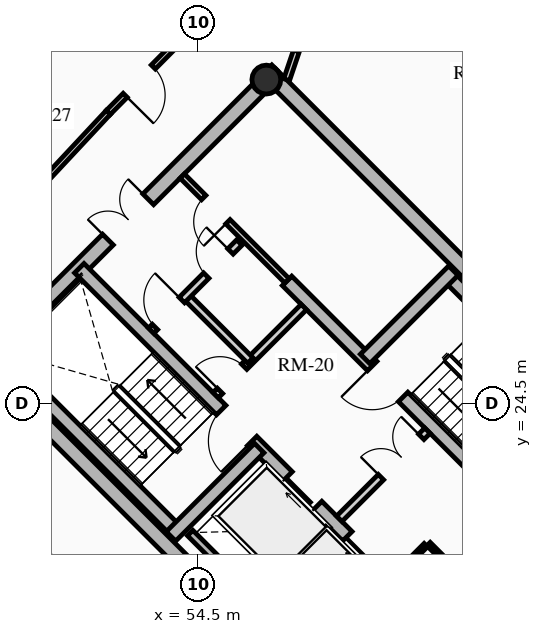
"""IFC4 building model, lengths in metres.
Left out: names, types, materials, properties, quantities, classifications, styles, units other than length and angle.
Written with IfcOpenShell. Run it as: python <this file> out.ifc"""

import sys

from ifc_helpers import new_model, si_unit, direction, frame, frame_2d, origin, origin_2d, place, context, subcontext, project, spatial, rectangle, hollow_circle, extrude, source, transform, mapped, element, fill, save


model = new_model("IFC4")
c1 = context("Model", 3, precision=1e-05, world=origin(), true_north=direction((0.0, 1.0)))
c2 = subcontext(c1, "Body", "Model", "MODEL_VIEW")
j1 = project(units=[si_unit("LENGTHUNIT", "METRE"), si_unit("PLANEANGLEUNIT", "RADIAN")], contexts=[c1])
p1 = place(None, origin())
s1 = spatial("IfcSite", under=j1, at=p1, CompositionType="ELEMENT")
p2 = place(p1, origin())
s2 = spatial("IfcBuilding", under=s1, at=p2, CompositionType="ELEMENT")
p3 = place(p2, frame((0.0, 0.0, 160.33)))
s3 = spatial("IfcBuildingStorey", under=s2, at=p3, CompositionType="ELEMENT", Elevation=160.33)
for number, where, z_axis, x_axis in (
    (1, (58.702, 15.732, 0.0), (0.0, 0.0, 1.0), (-0.707, 0.707, 0.0)),
    (2, (66.268, 23.298, 0.0), (0.0, 0.0, 1.0), (-0.707, 0.707, 0.0)),
):
    element("IfcWall", number, at=place(p3, frame(where, z_axis=z_axis, x_axis=x_axis)), inside=s3, PredefinedType="SHEAR", context=c2, shape_type="SweptSolid", body=[
        extrude(rectangle(XDim=14.1, YDim=0.4, at=frame_2d((7.05, 0.0))), origin(), (0.0, 0.0, 1.0), 2.91),
    ])
p4 = place(p3, frame((58.561, 15.873, 0.0), z_axis=(0.0, 0.0, 1.0), x_axis=(0.707106781187, 0.707106781187, 0.0)))
e3 = element("IfcWall", 3, at=p4, inside=s3, PredefinedType="SHEAR", context=c2, shape_type="SweptSolid", body=[
    extrude(rectangle(XDim=10.7, YDim=0.4, at=frame_2d((5.35, 0.0))), origin(), (0.0, 0.0, 1.0), 2.91),
])
m1 = source(origin(), c2, "Body", "SweptSolid", [
    extrude(rectangle(XDim=1.5, YDim=2.02, at=frame_2d((0.75, 1.01))), frame((0.0, 0.21, 0.0), z_axis=(0.0, -1.0, 0.0), x_axis=(1.0, 0.0, 0.0)), (0.0, 0.0, 1.0), 0.42),
])
p5 = place(p4, frame((5.45, 0.0, 0.0)))
e4 = element("IfcOpeningElement", 4, at=p5, cuts=e3, PredefinedType="OPENING", context=c2, shape_type="MappedRepresentation", body=[
    mapped(m1, transform((0.0, 0.0, 0.0), x_axis=(1.0, 0.0, 0.0), y_axis=(0.0, 1.0, 0.0), z_axis=(0.0, 0.0, 1.0), scale=1.0)),
])
p6 = place(p3, frame((48.873, 25.561, 0.0), z_axis=(0.0, 0.0, 1.0), x_axis=(0.707106781187, 0.707106781187, 0.0)))
e5 = element("IfcWall", 5, at=p6, inside=s3, PredefinedType="SHEAR", context=c2, shape_type="SweptSolid", body=[
    extrude(rectangle(XDim=10.7, YDim=0.4, at=frame_2d((5.35, 0.0))), origin(), (0.0, 0.0, 1.0), 2.91),
])
p7 = place(p6, frame((4.6, 0.0, 0.0)))
e6 = element("IfcOpeningElement", 6, at=p7, cuts=e5, PredefinedType="OPENING", context=c2, shape_type="MappedRepresentation", body=[
    mapped(m1, transform((0.0, 0.0, 0.0), x_axis=(1.0, 0.0, 0.0), y_axis=(0.0, 1.0, 0.0), z_axis=(0.0, 0.0, 1.0), scale=1.0)),
])
p8 = place(p3, frame((61.06, 18.373, 0.0), z_axis=(0.0, 0.0, 1.0), x_axis=(-0.707106781187, 0.707106781187, 0.0)))
e7 = element("IfcWall", 7, at=p8, inside=s3, PredefinedType="SHEAR", context=c2, shape_type="SweptSolid", body=[
    extrude(rectangle(XDim=13.7, YDim=0.35, at=frame_2d((6.85, 0.0))), origin(), (0.0, 0.0, 1.0), 2.91),
])
m2 = source(origin(), c2, "Body", "SweptSolid", [
    extrude(rectangle(XDim=1.1, YDim=2.015, at=frame_2d((0.55, 1.007))), frame((0.0, 0.185, 0.0), z_axis=(0.0, -1.0, 0.0), x_axis=(1.0, 0.0, 0.0)), (0.0, 0.0, 1.0), 0.37),
])
p9 = place(p8, frame((4.85, 0.0, 0.0)))
e8 = element("IfcOpeningElement", 8, at=p9, cuts=e7, PredefinedType="OPENING", context=c2, shape_type="MappedRepresentation", body=[
    mapped(m2, transform((0.0, 0.0, 0.0), x_axis=(1.0, 0.0, 0.0), y_axis=(0.0, 1.0, 0.0), z_axis=(0.0, 0.0, 1.0), scale=1.0)),
])
p10 = place(p8, frame((0.625, 0.0, 0.0)))
e9 = element("IfcOpeningElement", 9, at=p10, cuts=e7, PredefinedType="OPENING", context=c2, shape_type="MappedRepresentation", body=[
    mapped(m2, transform((0.0, 0.0, 0.0), x_axis=(1.0, 0.0, 0.0), y_axis=(0.0, 1.0, 0.0), z_axis=(0.0, 0.0, 1.0), scale=1.0)),
])
p11 = place(p8, frame((2.625, 0.0, 0.0)))
e10 = element("IfcOpeningElement", 10, at=p11, cuts=e7, PredefinedType="OPENING", context=c2, shape_type="MappedRepresentation", body=[
    mapped(m2, transform((0.0, 0.0, 0.0), x_axis=(1.0, 0.0, 0.0), y_axis=(0.0, 1.0, 0.0), z_axis=(0.0, 0.0, 1.0), scale=1.0)),
])
m3 = source(origin(), c2, "Body", "SweptSolid", [
    extrude(rectangle(XDim=1.15, YDim=2.02, at=frame_2d((0.575, 1.01))), frame((0.0, 0.185, 0.0), z_axis=(0.0, -1.0, 0.0), x_axis=(1.0, 0.0, 0.0)), (0.0, 0.0, 1.0), 0.37),
])
p12 = place(p8, frame((7.27, 0.0, 0.0)))
e11 = element("IfcOpeningElement", 11, at=p12, cuts=e7, PredefinedType="OPENING", context=c2, shape_type="MappedRepresentation", body=[
    mapped(m3, transform((0.0, 0.0, 0.0), x_axis=(1.0, 0.0, 0.0), y_axis=(0.0, 1.0, 0.0), z_axis=(0.0, 0.0, 1.0), scale=1.0)),
])
p13 = place(p3, frame((63.627, 20.94, 0.0), z_axis=(0.0, 0.0, 1.0), x_axis=(-0.707119496762, 0.707094065383, 0.0)))
e12 = element("IfcWall", 12, at=p13, inside=s3, PredefinedType="SHEAR", context=c2, shape_type="SweptSolid", body=[
    extrude(rectangle(XDim=9.6, YDim=0.35, at=frame_2d((4.8, 0.0))), origin(), (0.0, 0.0, 1.0), 2.91),
])
p14 = place(p13, frame((5.28, 0.0, 0.0)))
e13 = element("IfcOpeningElement", 13, at=p14, cuts=e12, PredefinedType="OPENING", context=c2, shape_type="MappedRepresentation", body=[
    mapped(m3, transform((0.0, 0.0, 0.0), x_axis=(1.0, 0.0, 0.0), y_axis=(0.0, 1.0, 0.0), z_axis=(0.0, 0.0, 1.0), scale=1.0)),
])
p15 = place(p3, frame((53.922, 21.141, 0.0), z_axis=(0.0, 0.0, 1.0), x_axis=(-0.707106781187, 0.707106781187, 0.0)))
e14 = element("IfcWall", 14, at=p15, inside=s3, PredefinedType="SHEAR", context=c2, shape_type="SweptSolid", body=[
    extrude(rectangle(XDim=6.695, YDim=0.35, at=frame_2d((3.348, 0.0))), origin(), (0.0, 0.0, 1.0), 2.91),
])
p16 = place(p3, frame((53.784, 21.003, 0.0), z_axis=(0.0, 0.0, 1.0), x_axis=(0.707106781187, 0.707106781187, 0.0)))
e15 = element("IfcWall", 15, at=p16, inside=s3, PredefinedType="SHEAR", context=c2, shape_type="SweptSolid", body=[
    extrude(rectangle(XDim=3.285, YDim=0.35, at=frame_2d((1.643, 0.0))), origin(), (0.0, 0.0, 1.0), 2.91),
])
p17 = place(p3, frame((65.812, 23.125, 0.0), z_axis=(0.0, 0.0, 1.0), x_axis=(-0.707106781187, 0.707106781187, 0.0)))
e16 = element("IfcWall", 16, at=p17, inside=s3, PredefinedType="SHEAR", context=c2, shape_type="SweptSolid", body=[
    extrude(rectangle(XDim=6.695, YDim=0.35, at=frame_2d((3.348, 0.0))), origin(), (0.0, 0.0, 1.0), 2.91),
])
p18 = place(p3, frame((58.893, 25.674, 0.0), z_axis=(0.0, 0.0, 1.0), x_axis=(0.707106781187, 0.707106781187, 0.0)))
e17 = element("IfcWall", 17, at=p18, inside=s3, PredefinedType="SHEAR", context=c2, shape_type="SweptSolid", body=[
    extrude(rectangle(XDim=3.285, YDim=0.35, at=frame_2d((1.643, 0.0))), origin(), (0.0, 0.0, 1.0), 2.91),
])
p19 = place(p3, frame((56.294, 33.024, 0.0), z_axis=(0.0, 0.0, 1.0), x_axis=(0.707106781187, 0.707106781187, 0.0)))
e18 = element("IfcColumn", 18, at=p19, inside=s3, PredefinedType="COLUMN", context=c2, shape_type="SweptSolid", body=[
    extrude(hollow_circle(Radius=0.38, WallThickness=0.032, at=origin_2d()), origin(), (0.0, 0.0, 1.0), 2.91),
])
p20 = place(p3, frame((55.888, 19.069, 0.0), z_axis=(0.0, 0.0, 1.0), x_axis=(0.707106781187, 0.707106781187, 0.0)))
e19 = element("IfcWall", 19, at=p20, inside=s3, PredefinedType="SHEAR", context=c2, shape_type="SweptSolid", body=[
    extrude(rectangle(XDim=2.97, YDim=0.2, at=frame_2d((1.485, 0.0))), origin(), (0.0, 0.0, 1.0), 2.91),
])
p21 = place(p3, frame((56.015, 19.366, 0.0), z_axis=(0.0, 0.0, 1.0), x_axis=(-0.707106781187, 0.707106781187, 0.0)))
e20 = element("IfcWall", 20, at=p21, inside=s3, PredefinedType="SHEAR", context=c2, shape_type="SweptSolid", body=[
    extrude(rectangle(XDim=2.44, YDim=0.2, at=frame_2d((1.22, 0.0))), origin(), (0.0, 0.0, 1.0), 2.91),
])
p22 = place(p3, frame((58.214, 21.467, 0.0), z_axis=(0.0, 0.0, 1.0), x_axis=(0.707106781187, 0.707106781187, 0.0)))
e21 = element("IfcWall", 21, at=p22, inside=s3, PredefinedType="PARTITIONING", context=c2, shape_type="SweptSolid", body=[
    extrude(rectangle(XDim=3.28, YDim=0.2, at=frame_2d((1.64, 0.0))), origin(), (0.0, 0.0, 1.0), 2.675),
])
m4 = source(origin(), c2, "Body", "SweptSolid", [
    extrude(rectangle(XDim=1.5, YDim=2.02, at=frame_2d((0.75, 1.01))), frame((0.0, 0.11, 0.0), z_axis=(0.0, -1.0, 0.0), x_axis=(1.0, 0.0, 0.0)), (0.0, 0.0, 1.0), 0.22),
])
p23 = place(p22, frame((1.55, 0.0, 0.0)))
e22 = element("IfcOpeningElement", 22, at=p23, cuts=e21, PredefinedType="OPENING", context=c2, shape_type="MappedRepresentation", body=[
    mapped(m4, transform((0.0, 0.0, 0.0), x_axis=(1.0, 0.0, 0.0), y_axis=(0.0, 1.0, 0.0), z_axis=(0.0, 0.0, 1.0), scale=1.0)),
])
p24 = place(p3, frame((54.961, 24.719, 0.0), z_axis=(0.0, 0.0, 1.0), x_axis=(0.707106781187, 0.707106781187, 0.0)))
e23 = element("IfcWall", 23, at=p24, inside=s3, PredefinedType="PARTITIONING", context=c2, shape_type="SweptSolid", body=[
    extrude(rectangle(XDim=3.28, YDim=0.2, at=frame_2d((1.64, 0.0))), origin(), (0.0, 0.0, 1.0), 2.675),
])
m5 = source(origin(), c2, "Body", "SweptSolid", [
    extrude(rectangle(XDim=0.9, YDim=2.005, at=frame_2d((0.45, 1.002))), frame((0.0, 0.11, 0.0), z_axis=(0.0, -1.0, 0.0), x_axis=(1.0, 0.0, 0.0)), (0.0, 0.0, 1.0), 0.22),
])
p25 = place(p24, frame((0.16, 0.0, 0.0)))
e24 = element("IfcOpeningElement", 24, at=p25, cuts=e23, PredefinedType="OPENING", context=c2, shape_type="MappedRepresentation", body=[
    mapped(m5, transform((0.0, 0.0, 0.0), x_axis=(1.0, 0.0, 0.0), y_axis=(0.0, 1.0, 0.0), z_axis=(0.0, 0.0, 1.0), scale=1.0)),
])
p26 = place(p3, frame((55.874, 25.631, 0.0), z_axis=(0.0, 0.0, 1.0), x_axis=(-0.707157639372, 0.707055919343, 0.0)))
e25 = element("IfcWall", 25, at=p26, inside=s3, PredefinedType="PARTITIONING", context=c2, shape_type="SweptSolid", body=[
    extrude(rectangle(XDim=2.4, YDim=0.2, at=frame_2d((1.2, 0.0))), origin(), (0.0, 0.0, 1.0), 2.675),
])
p27 = place(p3, frame((53.264, 26.416, 0.0), z_axis=(0.0, 0.0, 1.0), x_axis=(0.707106781187, 0.707106781187, 0.0)))
e26 = element("IfcWall", 26, at=p27, inside=s3, PredefinedType="PARTITIONING", context=c2, shape_type="SweptSolid", body=[
    extrude(rectangle(XDim=3.28, YDim=0.2, at=frame_2d((1.64, 0.0))), origin(), (0.0, 0.0, 1.0), 2.675),
])
m6 = source(origin(), c2, "Body", "SweptSolid", [
    extrude(rectangle(XDim=1.0, YDim=2.015, at=frame_2d((0.5, 1.007))), frame((0.0, 0.11, 0.0), z_axis=(0.0, -1.0, 0.0), x_axis=(1.0, 0.0, 0.0)), (0.0, 0.0, 1.0), 0.22),
])
p28 = place(p27, frame((0.14, 0.0, 0.0)))
e27 = element("IfcOpeningElement", 27, at=p28, cuts=e26, PredefinedType="OPENING", context=c2, shape_type="MappedRepresentation", body=[
    mapped(m6, transform((0.0, 0.0, 0.0), x_axis=(1.0, 0.0, 0.0), y_axis=(0.0, 1.0, 0.0), z_axis=(0.0, 0.0, 1.0), scale=1.0)),
])
p29 = place(p27, frame((2.05, 0.0, 0.0)))
e28 = element("IfcOpeningElement", 28, at=p29, cuts=e26, PredefinedType="OPENING", context=c2, shape_type="MappedRepresentation", body=[
    mapped(m5, transform((0.0, 0.0, 0.0), x_axis=(1.0, 0.0, 0.0), y_axis=(0.0, 1.0, 0.0), z_axis=(0.0, 0.0, 1.0), scale=1.0)),
])
p30 = place(p3, frame((61.835, 19.529, 0.0), z_axis=(0.0, 0.0, 1.0), x_axis=(-0.707174592913, 0.707038962956, 0.0)))
e29 = element("IfcWall", 29, at=p30, inside=s3, PredefinedType="PARTITIONING", context=c2, shape_type="SweptSolid", body=[
    extrude(rectangle(XDim=1.8, YDim=0.125, at=frame_2d((0.9, 0.0))), origin(), (0.0, 0.0, 1.0), 2.675),
])
m7 = source(origin(), c2, "Body", "SweptSolid", [
    extrude(rectangle(XDim=0.9, YDim=2.005, at=frame_2d((0.45, 1.002))), frame((0.0, 0.073, 0.0), z_axis=(0.0, -1.0, 0.0), x_axis=(1.0, 0.0, 0.0)), (0.0, 0.0, 1.0), 0.145),
])
p31 = place(p30, frame((0.42, 0.0, 0.0)))
e30 = element("IfcOpeningElement", 30, at=p31, cuts=e29, PredefinedType="OPENING", context=c2, shape_type="MappedRepresentation", body=[
    mapped(m7, transform((0.0, 0.0, 0.0), x_axis=(1.0, 0.0, 0.0), y_axis=(0.0, 1.0, 0.0), z_axis=(0.0, 0.0, 1.0), scale=1.0)),
])
p32 = place(p3, frame((59.713, 19.996, 0.0), z_axis=(0.0, 0.0, 1.0), x_axis=(0.707217726, 0.706995818963, 0.0)))
e31 = element("IfcWall", 31, at=p32, inside=s3, PredefinedType="PARTITIONING", context=c2, shape_type="SweptSolid", body=[
    extrude(rectangle(XDim=1.1, YDim=0.125, at=frame_2d((0.55, 0.0))), origin(), (0.0, 0.0, 1.0), 2.675),
])
p33 = place(p3, frame((56.839, 27.728, 0.0), z_axis=(0.0, 0.0, 1.0), x_axis=(-0.707106781187, 0.707106781187, 0.0)))
e32 = element("IfcWall", 32, at=p33, inside=s3, PredefinedType="PARTITIONING", context=c2, shape_type="SweptSolid", body=[
    extrude(rectangle(XDim=3.9, YDim=0.16, at=frame_2d((1.95, 0.0))), origin(), (0.0, 0.0, 1.0), 2.675),
])
m8 = source(origin(), c2, "Body", "SweptSolid", [
    extrude(rectangle(XDim=0.9, YDim=2.005, at=frame_2d((0.45, 1.002))), frame((0.0, 0.09, 0.0), z_axis=(0.0, -1.0, 0.0), x_axis=(1.0, 0.0, 0.0)), (0.0, 0.0, 1.0), 0.18),
])
p34 = place(p33, frame((2.2, 0.0, 0.0)))
e33 = element("IfcOpeningElement", 33, at=p34, cuts=e32, PredefinedType="OPENING", context=c2, shape_type="MappedRepresentation", body=[
    mapped(m8, transform((0.0, 0.0, 0.0), x_axis=(1.0, 0.0, 0.0), y_axis=(0.0, 1.0, 0.0), z_axis=(0.0, 0.0, 1.0), scale=1.0)),
])
p35 = place(p3, frame((54.488, 34.535, 0.0), z_axis=(0.0, 0.0, 1.0), x_axis=(-0.703666289339, -0.710530613871, 0.0)))
e34 = element("IfcWall", 34, at=p35, inside=s3, PredefinedType="PARTITIONING", context=c2, shape_type="SweptSolid", body=[
    extrude(rectangle(XDim=3.343, YDim=0.15, at=frame_2d((1.672, 0.0))), origin(), (0.0, 0.0, 1.0), 2.245),
])
m9 = source(origin(), c2, "Body", "SweptSolid", [
    extrude(rectangle(XDim=1.05, YDim=2.015, at=frame_2d((0.525, 1.007))), frame((0.0, 0.085, 0.0), z_axis=(0.0, -1.0, 0.0), x_axis=(1.0, 0.0, 0.0)), (0.0, 0.0, 1.0), 0.17),
])
p36 = place(p35, frame((1.66, 0.0, 0.0)))
e35 = element("IfcOpeningElement", 35, at=p36, cuts=e34, PredefinedType="OPENING", context=c2, shape_type="MappedRepresentation", body=[
    mapped(m9, transform((0.0, 0.0, 0.0), x_axis=(1.0, 0.0, 0.0), y_axis=(0.0, 1.0, 0.0), z_axis=(0.0, 0.0, 1.0), scale=1.0)),
])
p37 = place(p3, frame((52.135, 32.159, 0.0), z_axis=(0.0, 0.0, 1.0), x_axis=(-0.682546302454, -0.730842353047, 0.0)))
e36 = element("IfcWall", 36, at=p37, inside=s3, PredefinedType="PARTITIONING", context=c2, shape_type="SweptSolid", body=[
    extrude(rectangle(XDim=6.445, YDim=0.15, at=frame_2d((3.223, 0.0))), origin(), (0.0, 0.0, 1.0), 2.245),
])
p38 = place(p3, frame((47.844, 23.253, 0.0), z_axis=(0.0, 0.0, 1.0), x_axis=(0.696248411352, -0.717800912293, 0.0)))
e37 = element("IfcWall", 37, at=p38, inside=s3, PredefinedType="PARTITIONING", context=c2, shape_type="SweptSolid", body=[
    extrude(rectangle(XDim=5.947, YDim=0.15, at=frame_2d((2.974, 0.0))), origin(), (0.0, 0.0, 1.0), 2.675),
])
p39 = place(p3, frame((56.828, 33.021, 0.0), z_axis=(0.0, 0.0, 1.0), x_axis=(0.321300161671, 0.94697740528, 0.0)))
e38 = element("IfcWall", 38, at=p39, inside=s3, PredefinedType="PARTITIONING", context=c2, shape_type="SweptSolid", body=[
    extrude(rectangle(XDim=2.049, YDim=0.16, at=frame_2d((1.024, 0.0))), origin(), (0.0, 0.0, 1.0), 2.245),
])
m10 = source(origin(), c2, "Body", "SweptSolid", [
    extrude(rectangle(XDim=1.05, YDim=2.015, at=frame_2d((0.525, 1.007))), frame((0.0, 0.09, 0.0), z_axis=(0.0, -1.0, 0.0), x_axis=(1.0, 0.0, 0.0)), (0.0, 0.0, 1.0), 0.18),
])
p40 = place(p39, frame((0.798, 0.0, 0.0)))
e39 = element("IfcOpeningElement", 39, at=p40, cuts=e38, PredefinedType="OPENING", context=c2, shape_type="MappedRepresentation", body=[
    mapped(m10, transform((0.0, 0.0, 0.0), x_axis=(1.0, 0.0, 0.0), y_axis=(0.0, 1.0, 0.0), z_axis=(0.0, 0.0, 1.0), scale=1.0)),
])
p41 = place(p3, frame((52.876, 35.954, 0.0), z_axis=(0.0, 0.0, 1.0), x_axis=(-0.750317340408, -0.661077823469, 0.0)))
e40 = element("IfcWall", 40, at=p41, inside=s3, PredefinedType="PARTITIONING", context=c2, shape_type="SweptSolid", body=[
    extrude(rectangle(XDim=3.669, YDim=0.125, at=frame_2d((1.834, 0.0))), origin(), (0.0, 0.0, 1.0), 2.245),
])
p42 = place(p3, frame((46.732, 21.959, 0.0), z_axis=(0.0, 0.0, 1.0), x_axis=(0.674328014222, -0.738431939474, 0.0)))
e41 = element("IfcWall", 41, at=p42, inside=s3, PredefinedType="PARTITIONING", context=c2, shape_type="SweptSolid", body=[
    extrude(rectangle(XDim=5.823, YDim=0.125, at=frame_2d((2.912, 0.0))), origin(), (0.0, 0.0, 1.0), 2.675),
])
p43 = place(p42, frame((2.462, 0.0, 0.0)))
e42 = element("IfcOpeningElement", 42, at=p43, cuts=e41, PredefinedType="OPENING", context=c2, shape_type="MappedRepresentation", body=[
    mapped(m7, transform((0.0, 0.0, 0.0), x_axis=(1.0, 0.0, 0.0), y_axis=(0.0, 1.0, 0.0), z_axis=(0.0, 0.0, 1.0), scale=1.0)),
])
m11 = source(origin(), c2, "Body", "SweptSolid", [
    extrude(rectangle(XDim=1.1, YDim=2.015, at=frame_2d((0.55, 1.007))), frame((0.0, 0.025, 0.0), z_axis=(0.0, -1.0, 0.0), x_axis=(1.0, 0.0, 0.0)), (0.0, 0.0, 1.0), 0.05),
])
p44 = place(p9, origin())
e43 = element("IfcDoor", 43, at=p44, inside=s3, OperationType="SLIDING_TO_RIGHT", PredefinedType="DOOR", context=c2, shape_type="MappedRepresentation", body=[
    mapped(m11, transform((0.0, 0.0, 0.0), x_axis=(1.0, 0.0, 0.0), y_axis=(0.0, 1.0, 0.0), z_axis=(0.0, 0.0, 1.0), scale=1.0)),
])
fill(e8, e43)
p45 = place(p11, origin())
e44 = element("IfcDoor", 44, at=p45, inside=s3, OperationType="SLIDING_TO_RIGHT", PredefinedType="DOOR", context=c2, shape_type="MappedRepresentation", body=[
    mapped(m11, transform((0.0, 0.0, 0.0), x_axis=(1.0, 0.0, 0.0), y_axis=(0.0, 1.0, 0.0), z_axis=(0.0, 0.0, 1.0), scale=1.0)),
])
fill(e10, e44)
m12 = source(origin(), c2, "Body", "SweptSolid", [
    extrude(rectangle(XDim=1.15, YDim=2.02, at=frame_2d((0.575, 1.01))), frame((0.0, 0.025, 0.0), z_axis=(0.0, -1.0, 0.0), x_axis=(1.0, 0.0, 0.0)), (0.0, 0.0, 1.0), 0.05),
])
p46 = place(p12, origin())
e45 = element("IfcDoor", 45, at=p46, inside=s3, OperationType="SINGLE_SWING_LEFT", PredefinedType="DOOR", context=c2, shape_type="MappedRepresentation", body=[
    mapped(m12, transform((0.0, 0.0, 0.0), x_axis=(1.0, 0.0, 0.0), y_axis=(0.0, 1.0, 0.0), z_axis=(0.0, 0.0, 1.0), scale=1.0)),
])
fill(e11, e45)
p47 = place(p14, origin())
e46 = element("IfcDoor", 46, at=p47, inside=s3, OperationType="SINGLE_SWING_RIGHT", PredefinedType="DOOR", context=c2, shape_type="MappedRepresentation", body=[
    mapped(m12, transform((0.0, 0.0, 0.0), x_axis=(1.0, 0.0, 0.0), y_axis=(0.0, 1.0, 0.0), z_axis=(0.0, 0.0, 1.0), scale=1.0)),
])
fill(e13, e46)
m13 = source(origin(), c2, "Body", "SweptSolid", [
    extrude(rectangle(XDim=1.5, YDim=2.02, at=frame_2d((0.75, 1.01))), frame((0.0, 0.025, 0.0), z_axis=(0.0, -1.0, 0.0), x_axis=(1.0, 0.0, 0.0)), (0.0, 0.0, 1.0), 0.05),
])
p48 = place(p7, origin())
e47 = element("IfcDoor", 47, at=p48, inside=s3, OperationType="DOUBLE_DOOR_SINGLE_SWING", PredefinedType="DOOR", context=c2, shape_type="MappedRepresentation", body=[
    mapped(m13, transform((0.0, 0.0, 0.0), x_axis=(1.0, 0.0, 0.0), y_axis=(0.0, 1.0, 0.0), z_axis=(0.0, 0.0, 1.0), scale=1.0)),
])
fill(e6, e47)
p49 = place(p23, origin())
e48 = element("IfcDoor", 48, at=p49, inside=s3, OperationType="DOUBLE_DOOR_SINGLE_SWING", PredefinedType="DOOR", context=c2, shape_type="MappedRepresentation", body=[
    mapped(m13, transform((0.0, 0.0, 0.0), x_axis=(1.0, 0.0, 0.0), y_axis=(0.0, 1.0, 0.0), z_axis=(0.0, 0.0, 1.0), scale=1.0)),
])
fill(e22, e48)
m14 = source(origin(), c2, "Body", "SweptSolid", [
    extrude(rectangle(XDim=0.9, YDim=2.005, at=frame_2d((0.45, 1.002))), frame((0.0, 0.025, 0.0), z_axis=(0.0, -1.0, 0.0), x_axis=(1.0, 0.0, 0.0)), (0.0, 0.0, 1.0), 0.05),
])
p50 = place(p25, origin())
e49 = element("IfcDoor", 49, at=p50, inside=s3, OperationType="SINGLE_SWING_LEFT", PredefinedType="DOOR", context=c2, shape_type="MappedRepresentation", body=[
    mapped(m14, transform((0.0, 0.0, 0.0), x_axis=(1.0, 0.0, 0.0), y_axis=(0.0, 1.0, 0.0), z_axis=(0.0, 0.0, 1.0), scale=1.0)),
])
fill(e24, e49)
m15 = source(origin(), c2, "Body", "SweptSolid", [
    extrude(rectangle(XDim=1.0, YDim=2.015, at=frame_2d((0.5, 1.007))), frame((0.0, 0.025, 0.0), z_axis=(0.0, -1.0, 0.0), x_axis=(1.0, 0.0, 0.0)), (0.0, 0.0, 1.0), 0.05),
])
p51 = place(p28, origin())
e50 = element("IfcDoor", 50, at=p51, inside=s3, OperationType="SINGLE_SWING_RIGHT", PredefinedType="DOOR", context=c2, shape_type="MappedRepresentation", body=[
    mapped(m15, transform((0.0, 0.0, 0.0), x_axis=(1.0, 0.0, 0.0), y_axis=(0.0, 1.0, 0.0), z_axis=(0.0, 0.0, 1.0), scale=1.0)),
])
fill(e27, e50)
p52 = place(p29, origin())
e51 = element("IfcDoor", 51, at=p52, inside=s3, OperationType="SINGLE_SWING_RIGHT", PredefinedType="DOOR", context=c2, shape_type="MappedRepresentation", body=[
    mapped(m14, transform((0.0, 0.0, 0.0), x_axis=(1.0, 0.0, 0.0), y_axis=(0.0, 1.0, 0.0), z_axis=(0.0, 0.0, 1.0), scale=1.0)),
])
fill(e28, e51)
p53 = place(p34, origin())
e52 = element("IfcDoor", 52, at=p53, inside=s3, OperationType="SINGLE_SWING_LEFT", PredefinedType="DOOR", context=c2, shape_type="MappedRepresentation", body=[
    mapped(m14, transform((0.0, 0.0, 0.0), x_axis=(1.0, 0.0, 0.0), y_axis=(0.0, 1.0, 0.0), z_axis=(0.0, 0.0, 1.0), scale=1.0)),
])
fill(e33, e52)
m16 = source(origin(), c2, "Body", "SweptSolid", [
    extrude(rectangle(XDim=1.05, YDim=2.015, at=frame_2d((0.525, 1.007))), frame((0.0, 0.025, 0.0), z_axis=(0.0, -1.0, 0.0), x_axis=(1.0, 0.0, 0.0)), (0.0, 0.0, 1.0), 0.05),
])
p54 = place(p36, origin())
e53 = element("IfcDoor", 53, at=p54, inside=s3, OperationType="SINGLE_SWING_RIGHT", PredefinedType="DOOR", context=c2, shape_type="MappedRepresentation", body=[
    mapped(m16, transform((0.0, 0.0, 0.0), x_axis=(1.0, 0.0, 0.0), y_axis=(0.0, 1.0, 0.0), z_axis=(0.0, 0.0, 1.0), scale=1.0)),
])
fill(e35, e53)
save(model, sys.argv[1])
